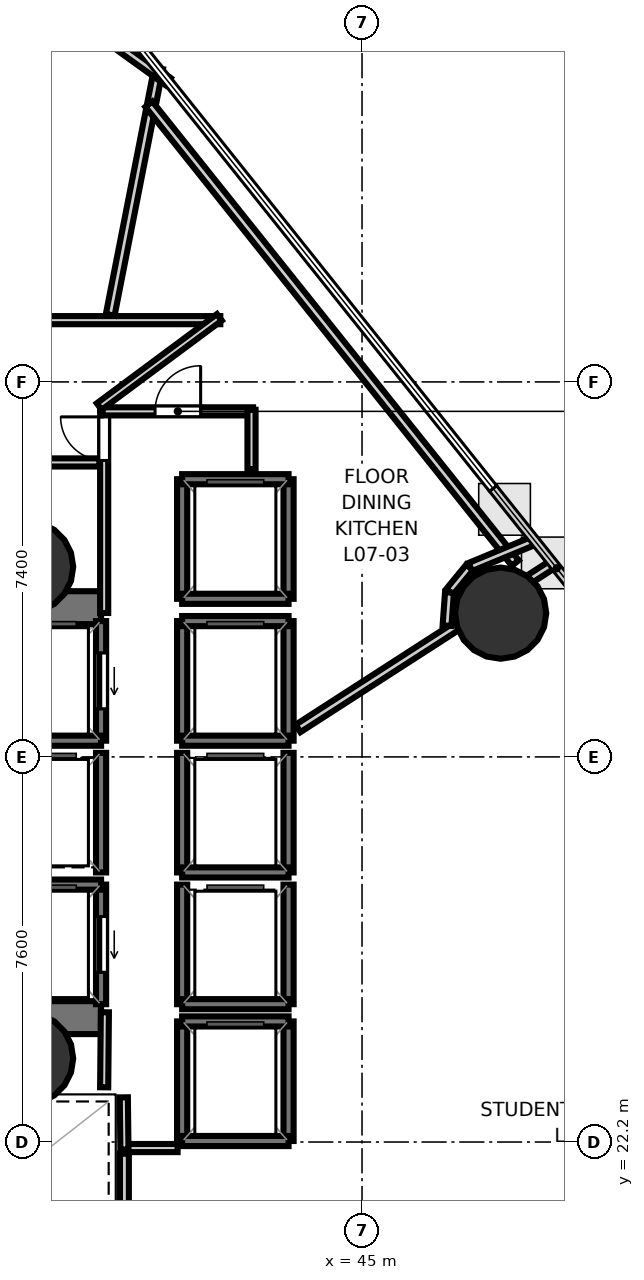
"""IFC4 building model, lengths in metres.
Left out: names, types, materials, properties, quantities, classifications, styles, units other than length and angle.
Written with IfcOpenShell. Run it as: python <this file> out.ifc"""

import sys

from ifc_helpers import new_model, si_unit, direction, frame, frame_2d, origin, origin_2d, place, context, subcontext, project, spatial, rectangle, hollow_circle, extrude, element, fill, save


model = new_model("IFC4")
c1 = context("Model", 3, precision=1e-05, world=origin(), true_north=direction((0.0, 1.0)))
c2 = subcontext(c1, "Body", "Model", "MODEL_VIEW")
j1 = project(units=[si_unit("LENGTHUNIT", "METRE"), si_unit("PLANEANGLEUNIT", "RADIAN")], contexts=[c1])
p1 = place(None, origin())
s1 = spatial("IfcSite", under=j1, at=p1, CompositionType="ELEMENT")
p2 = place(p1, origin())
s2 = spatial("IfcBuilding", under=s1, at=p2, CompositionType="ELEMENT")
p3 = place(p2, frame((0.0, 0.0, 33.1)))
s3 = spatial("IfcBuildingStorey", under=s2, at=p3, CompositionType="ELEMENT", Elevation=33.1)
p4 = place(p3, frame((29.13, 32.745, 0.0), z_axis=(0.0, 0.0, 1.0), x_axis=(1.0, 0.0, 0.0)))
e1 = element("IfcWall", 1, at=p4, inside=s3, PredefinedType="SHEAR", context=c2, shape_type="SweptSolid", body=[
    extrude(rectangle(XDim=10.72, YDim=0.65, at=frame_2d((5.36, 0.0))), origin(), (0.0, 0.0, 1.0), 3.52),
])
p5 = place(p4, frame((1.095, 0.0, 0.0)))
e2 = element("IfcOpeningElement", 2, at=p5, cuts=e1, PredefinedType="OPENING", context=c2, shape_type="SweptSolid", body=[
    extrude(rectangle(XDim=1.25, YDim=2.15, at=frame_2d((0.625, 1.075))), frame((0.0, 0.335, 0.0), z_axis=(0.0, -1.0, 0.0), x_axis=(1.0, 0.0, 0.0)), (0.0, 0.0, 1.0), 0.67),
])
p6 = place(p3, frame((29.13, 24.655, 0.0), z_axis=(0.0, 0.0, 1.0), x_axis=(1.0, 0.0, 0.0)))
e3 = element("IfcWall", 3, at=p6, inside=s3, PredefinedType="SHEAR", context=c2, shape_type="SweptSolid", body=[
    extrude(rectangle(XDim=10.72, YDim=0.65, at=frame_2d((5.36, 0.0))), origin(), (0.0, 0.0, 1.0), 3.52),
])
p7 = place(p6, frame((0.895, 0.0, 0.0)))
e4 = element("IfcOpeningElement", 4, at=p7, cuts=e3, PredefinedType="OPENING", context=c2, shape_type="SweptSolid", body=[
    extrude(rectangle(XDim=1.25, YDim=2.15, at=frame_2d((0.625, 1.075))), frame((0.0, 0.335, 0.0), z_axis=(0.0, -1.0, 0.0), x_axis=(1.0, 0.0, 0.0)), (0.0, 0.0, 1.0), 0.67),
])
for number, where, z_axis, x_axis in (
    (5, (38.4, 33.55, 0.0), (0.0, 0.0, 1.0), (1.0, 0.0, 0.0)),
    (6, (38.4, 23.85, 0.0), (0.0, 0.0, 1.0), (1.0, 0.0, 0.0)),
    (7, (47.736, 32.637, 0.0), (0.0, 0.0, 1.0), (1.0, 0.0, 0.0)),
):
    element("IfcColumn", number, at=place(p3, frame(where, z_axis=z_axis, x_axis=x_axis)), inside=s3, PredefinedType="COLUMN", context=c2, shape_type="SweptSolid", body=[
        extrude(hollow_circle(Radius=0.9, WallThickness=0.045, at=origin_2d()), origin(), (0.0, 0.0, 1.0), 3.7),
    ])
p8 = place(p3, frame((40.147, 44.413, 0.0), z_axis=(0.0, 0.0, 1.0), x_axis=(-0.997124396063, -0.07578217981, 0.0)))
e8 = element("IfcWall", 8, at=p8, inside=s3, PredefinedType="SOLIDWALL", context=c2, shape_type="SweptSolid", body=[
    extrude(rectangle(XDim=13.457, YDim=0.28, at=frame_2d((6.728, 0.0))), origin(), (0.0, 0.0, 1.0), 3.52),
])
p9 = place(p8, frame((3.137, 0.0, 0.85)))
e9 = element("IfcOpeningElement", 9, at=p9, cuts=e8, PredefinedType="OPENING", context=c2, shape_type="SweptSolid", body=[
    extrude(rectangle(XDim=1.8, YDim=2.1, at=frame_2d((0.9, 1.05))), frame((0.0, 0.15, 0.0), z_axis=(0.0, -1.0, 0.0), x_axis=(1.0, 0.0, 0.0)), (0.0, 0.0, 1.0), 0.3),
])
p10 = place(p8, frame((7.56, 0.0, 0.85)))
e10 = element("IfcOpeningElement", 10, at=p10, cuts=e8, PredefinedType="OPENING", context=c2, shape_type="SweptSolid", body=[
    extrude(rectangle(XDim=1.8, YDim=2.1, at=frame_2d((0.9, 1.05))), frame((0.0, 0.15, 0.0), z_axis=(0.0, -1.0, 0.0), x_axis=(1.0, 0.0, 0.0)), (0.0, 0.0, 1.0), 0.3),
])
p11 = place(p3, frame((39.85, 30.12, 0.0), z_axis=(0.0, 0.0, 1.0), x_axis=(0.0, 1.0, 0.0)))
e11 = element("IfcWall", 11, at=p11, inside=s3, PredefinedType="SOLIDWALL", context=c2, shape_type="SweptSolid", body=[
    extrude(rectangle(XDim=2.36, YDim=0.2, at=frame_2d((1.18, 0.0))), origin(), (0.0, 0.0, 1.0), 3.52),
])
p12 = place(p11, frame((0.63, 0.0, 0.0)))
e12 = element("IfcOpeningElement", 12, at=p12, cuts=e11, PredefinedType="OPENING", context=c2, shape_type="SweptSolid", body=[
    extrude(rectangle(XDim=1.1, YDim=2.15, at=frame_2d((0.55, 1.075))), frame((0.0, 0.11, 0.0), z_axis=(0.0, -1.0, 0.0), x_axis=(1.0, 0.0, 0.0)), (0.0, 0.0, 1.0), 0.22),
])
p13 = place(p3, frame((37.75, 30.12, 0.0), z_axis=(0.0, 0.0, 1.0), x_axis=(1.0, 0.0, 0.0)))
e13 = element("IfcWall", 13, at=p13, inside=s3, PredefinedType="SOLIDWALL", context=c2, shape_type="SweptSolid", body=[
    extrude(rectangle(XDim=2.1, YDim=0.2, at=frame_2d((1.05, 0.0))), origin(), (0.0, 0.0, 1.0), 3.52),
])
p14 = place(p3, frame((39.85, 24.92, 0.0), z_axis=(0.0, 0.0, 1.0), x_axis=(0.0, 1.0, 0.0)))
e14 = element("IfcWall", 14, at=p14, inside=s3, PredefinedType="SOLIDWALL", context=c2, shape_type="SweptSolid", body=[
    extrude(rectangle(XDim=2.36, YDim=0.2, at=frame_2d((1.18, 0.0))), origin(), (0.0, 0.0, 1.0), 3.52),
])
p15 = place(p14, frame((0.63, 0.0, 0.0)))
e15 = element("IfcOpeningElement", 15, at=p15, cuts=e14, PredefinedType="OPENING", context=c2, shape_type="SweptSolid", body=[
    extrude(rectangle(XDim=1.1, YDim=2.15, at=frame_2d((0.55, 1.075))), frame((0.0, 0.11, 0.0), z_axis=(0.0, -1.0, 0.0), x_axis=(1.0, 0.0, 0.0)), (0.0, 0.0, 1.0), 0.22),
])
p16 = place(p3, frame((37.75, 27.28, 0.0), z_axis=(0.0, 0.0, 1.0), x_axis=(1.0, 0.0, 0.0)))
e16 = element("IfcWall", 16, at=p16, inside=s3, PredefinedType="SOLIDWALL", context=c2, shape_type="SweptSolid", body=[
    extrude(rectangle(XDim=2.1, YDim=0.2, at=frame_2d((1.05, 0.0))), origin(), (0.0, 0.0, 1.0), 3.52),
])
for number, where, z_axis, x_axis in (
    (17, (43.55, 30.12, 0.0), (0.0, 0.0, 1.0), (0.0, 1.0, 0.0)),
    (18, (41.45, 30.12, 0.0), (0.0, 0.0, 1.0), (0.0, 1.0, 0.0)),
):
    element("IfcWall", number, at=place(p3, frame(where, z_axis=z_axis, x_axis=x_axis)), inside=s3, PredefinedType="SOLIDWALL", context=c2, shape_type="SweptSolid", body=[
        extrude(rectangle(XDim=2.36, YDim=0.2, at=frame_2d((1.18, 0.0))), origin(), (0.0, 0.0, 1.0), 3.52),
    ])
for number, where, z_axis, x_axis in (
    (19, (41.45, 32.48, 0.0), (0.0, 0.0, 1.0), (1.0, 0.0, 0.0)),
    (20, (41.45, 30.12, 0.0), (0.0, 0.0, 1.0), (1.0, 0.0, 0.0)),
):
    element("IfcWall", number, at=place(p3, frame(where, z_axis=z_axis, x_axis=x_axis)), inside=s3, PredefinedType="SOLIDWALL", context=c2, shape_type="SweptSolid", body=[
        extrude(rectangle(XDim=2.1, YDim=0.2, at=frame_2d((1.05, 0.0))), origin(), (0.0, 0.0, 1.0), 3.52),
    ])
for number, where, z_axis, x_axis in (
    (21, (43.55, 27.52, 0.0), (0.0, 0.0, 1.0), (0.0, 1.0, 0.0)),
    (22, (41.45, 27.52, 0.0), (0.0, 0.0, 1.0), (0.0, 1.0, 0.0)),
):
    element("IfcWall", number, at=place(p3, frame(where, z_axis=z_axis, x_axis=x_axis)), inside=s3, PredefinedType="SOLIDWALL", context=c2, shape_type="SweptSolid", body=[
        extrude(rectangle(XDim=2.36, YDim=0.2, at=frame_2d((1.18, 0.0))), origin(), (0.0, 0.0, 1.0), 3.52),
    ])
p17 = place(p3, frame((41.45, 27.52, 0.0), z_axis=(0.0, 0.0, 1.0), x_axis=(1.0, 0.0, 0.0)))
e23 = element("IfcWall", 23, at=p17, inside=s3, PredefinedType="SOLIDWALL", context=c2, shape_type="SweptSolid", body=[
    extrude(rectangle(XDim=2.1, YDim=0.2, at=frame_2d((1.05, 0.0))), origin(), (0.0, 0.0, 1.0), 3.52),
])
for number, where, z_axis, x_axis in (
    (24, (43.55, 24.92, 0.0), (0.0, 0.0, 1.0), (0.0, 1.0, 0.0)),
    (25, (41.45, 24.92, 0.0), (0.0, 0.0, 1.0), (0.0, 1.0, 0.0)),
):
    element("IfcWall", number, at=place(p3, frame(where, z_axis=z_axis, x_axis=x_axis)), inside=s3, PredefinedType="SOLIDWALL", context=c2, shape_type="SweptSolid", body=[
        extrude(rectangle(XDim=2.36, YDim=0.2, at=frame_2d((1.18, 0.0))), origin(), (0.0, 0.0, 1.0), 3.52),
    ])
p18 = place(p3, frame((41.45, 24.92, 0.0), z_axis=(0.0, 0.0, 1.0), x_axis=(1.0, 0.0, 0.0)))
e26 = element("IfcWall", 26, at=p18, inside=s3, PredefinedType="SOLIDWALL", context=c2, shape_type="SweptSolid", body=[
    extrude(rectangle(XDim=2.1, YDim=0.2, at=frame_2d((1.05, 0.0))), origin(), (0.0, 0.0, 1.0), 3.52),
])
p19 = place(p3, frame((39.85, 27.52, 0.0), z_axis=(0.0, 0.0, 1.0), x_axis=(0.0, 1.0, 0.0)))
e27 = element("IfcWall", 27, at=p19, inside=s3, PredefinedType="SOLIDWALL", context=c2, shape_type="SweptSolid", body=[
    extrude(rectangle(XDim=2.36, YDim=0.2, at=frame_2d((1.18, 0.0))), origin(), (0.0, 0.0, 1.0), 3.52),
])
for number, where, z_axis, x_axis in (
    (28, (43.55, 22.22, 0.0), (0.0, 0.0, 1.0), (0.0, 1.0, 0.0)),
    (29, (41.45, 22.22, 0.0), (0.0, 0.0, 1.0), (0.0, 1.0, 0.0)),
):
    element("IfcWall", number, at=place(p3, frame(where, z_axis=z_axis, x_axis=x_axis)), inside=s3, PredefinedType="SOLIDWALL", context=c2, shape_type="SweptSolid", body=[
        extrude(rectangle(XDim=2.36, YDim=0.2, at=frame_2d((1.18, 0.0))), origin(), (0.0, 0.0, 1.0), 3.52),
    ])
for number, where, z_axis, x_axis in (
    (30, (41.45, 24.58, 0.0), (0.0, 0.0, 1.0), (1.0, 0.0, 0.0)),
    (31, (41.45, 22.22, 0.0), (0.0, 0.0, 1.0), (1.0, 0.0, 0.0)),
):
    element("IfcWall", number, at=place(p3, frame(where, z_axis=z_axis, x_axis=x_axis)), inside=s3, PredefinedType="SOLIDWALL", context=c2, shape_type="SweptSolid", body=[
        extrude(rectangle(XDim=2.1, YDim=0.2, at=frame_2d((1.05, 0.0))), origin(), (0.0, 0.0, 1.0), 3.52),
    ])
for number, where, z_axis, x_axis in (
    (32, (43.55, 32.92, 0.0), (0.0, 0.0, 1.0), (0.0, 1.0, 0.0)),
    (33, (41.45, 32.92, 0.0), (0.0, 0.0, 1.0), (0.0, 1.0, 0.0)),
):
    element("IfcWall", number, at=place(p3, frame(where, z_axis=z_axis, x_axis=x_axis)), inside=s3, PredefinedType="SOLIDWALL", context=c2, shape_type="SweptSolid", body=[
        extrude(rectangle(XDim=2.36, YDim=0.2, at=frame_2d((1.18, 0.0))), origin(), (0.0, 0.0, 1.0), 3.52),
    ])
for number, where, z_axis, x_axis in (
    (34, (41.45, 35.28, 0.0), (0.0, 0.0, 1.0), (1.0, 0.0, 0.0)),
    (35, (41.45, 32.92, 0.0), (0.0, 0.0, 1.0), (1.0, 0.0, 0.0)),
):
    element("IfcWall", number, at=place(p3, frame(where, z_axis=z_axis, x_axis=x_axis)), inside=s3, PredefinedType="SOLIDWALL", context=c2, shape_type="SweptSolid", body=[
        extrude(rectangle(XDim=2.1, YDim=0.2, at=frame_2d((1.05, 0.0))), origin(), (0.0, 0.0, 1.0), 3.52),
    ])
p20 = place(p3, frame((39.911, 32.64, 0.0), z_axis=(0.0, 0.0, 1.0), x_axis=(0.0, 1.0, 0.0)))
e36 = element("IfcWall", 36, at=p20, inside=s3, PredefinedType="PARTITIONING", context=c2, shape_type="SweptSolid", body=[
    extrude(rectangle(XDim=4.01, YDim=0.16, at=frame_2d((2.005, 0.0))), origin(), (0.0, 0.0, 1.0), 2.84),
])
p21 = place(p20, frame((3.01, 0.0, 0.0)))
e37 = element("IfcOpeningElement", 37, at=p21, cuts=e36, PredefinedType="OPENING", context=c2, shape_type="SweptSolid", body=[
    extrude(rectangle(XDim=0.86, YDim=2.05, at=frame_2d((0.43, 1.025))), frame((0.0, 0.09, 0.0), z_axis=(0.0, -1.0, 0.0), x_axis=(1.0, 0.0, 0.0)), (0.0, 0.0, 1.0), 0.18),
])
p22 = place(p3, frame((39.88, 36.619, 0.0), z_axis=(0.0, 0.0, 1.0), x_axis=(1.0, 0.0, 0.0)))
e38 = element("IfcWall", 38, at=p22, inside=s3, PredefinedType="PARTITIONING", context=c2, shape_type="SweptSolid", body=[
    extrude(rectangle(XDim=2.97, YDim=0.16, at=frame_2d((1.485, 0.0))), origin(), (0.0, 0.0, 1.0), 2.84),
])
p23 = place(p22, frame((1.035, 0.0, 0.0)))
e39 = element("IfcOpeningElement", 39, at=p23, cuts=e38, PredefinedType="OPENING", context=c2, shape_type="SweptSolid", body=[
    extrude(rectangle(XDim=0.9, YDim=2.1, at=frame_2d((0.45, 1.05))), frame((0.0, 0.09, 0.0), z_axis=(0.0, -1.0, 0.0), x_axis=(1.0, 0.0, 0.0)), (0.0, 0.0, 1.0), 0.18),
])
p24 = place(p3, frame((42.819, 36.65, 0.0), z_axis=(0.0, 0.0, 1.0), x_axis=(0.0, -1.0, 0.0)))
e40 = element("IfcWall", 40, at=p24, inside=s3, PredefinedType="PARTITIONING", context=c2, shape_type="SweptSolid", body=[
    extrude(rectangle(XDim=1.17, YDim=0.16, at=frame_2d((0.585, 0.0))), origin(), (0.0, 0.0, 1.0), 2.84),
])
p25 = place(p3, frame((41.36, 22.081, 0.0), z_axis=(0.0, 0.0, 1.0), x_axis=(-1.0, 0.0, 0.0)))
e41 = element("IfcWall", 41, at=p25, inside=s3, PredefinedType="PARTITIONING", context=c2, shape_type="SweptSolid", body=[
    extrude(rectangle(XDim=1.08, YDim=0.16, at=frame_2d((0.54, 0.0))), origin(), (0.0, 0.0, 1.0), 2.84),
])
p26 = place(p3, frame((40.311, 22.05, 0.0), z_axis=(0.0, 0.0, 1.0), x_axis=(-0.011836292006, 0.999929948642, 0.0)))
e42 = element("IfcWall", 42, at=p26, inside=s3, PredefinedType="PARTITIONING", context=c2, shape_type="SweptSolid", body=[
    extrude(rectangle(XDim=1.031, YDim=0.16, at=frame_2d((0.516, 0.0))), origin(), (0.0, 0.0, 1.0), 2.84),
])
p27 = place(p3, frame((39.911, 23.28, 0.0), z_axis=(0.0, 0.0, 1.0), x_axis=(0.009397771291, 0.999955839972, 0.0)))
e43 = element("IfcWall", 43, at=p27, inside=s3, PredefinedType="PARTITIONING", context=c2, shape_type="SweptSolid", body=[
    extrude(rectangle(XDim=1.481, YDim=0.16, at=frame_2d((0.74, 0.0))), origin(), (0.0, 0.0, 1.0), 2.84),
])
p28 = place(p3, frame((26.42, 38.419, 0.0), z_axis=(0.0, 0.0, 1.0), x_axis=(1.0, 0.0, 0.0)))
e44 = element("IfcWall", 44, at=p28, inside=s3, PredefinedType="PARTITIONING", context=c2, shape_type="SweptSolid", body=[
    extrude(rectangle(XDim=15.783, YDim=0.16, at=frame_2d((7.892, 0.0))), origin(), (0.0, 0.0, 1.0), 2.798),
])
p29 = place(p28, frame((9.246, 0.0, 0.0)))
e45 = element("IfcOpeningElement", 45, at=p29, cuts=e44, PredefinedType="OPENING", context=c2, shape_type="SweptSolid", body=[
    extrude(rectangle(XDim=0.9, YDim=2.1, at=frame_2d((0.45, 1.05))), frame((0.0, 0.09, 0.0), z_axis=(0.0, -1.0, 0.0), x_axis=(1.0, 0.0, 0.0)), (0.0, 0.0, 1.0), 0.18),
])
p30 = place(p28, frame((2.836, 0.0, 0.0)))
e46 = element("IfcOpeningElement", 46, at=p30, cuts=e44, PredefinedType="OPENING", context=c2, shape_type="SweptSolid", body=[
    extrude(rectangle(XDim=0.9, YDim=2.1, at=frame_2d((0.45, 1.05))), frame((0.0, 0.09, 0.0), z_axis=(0.0, -1.0, 0.0), x_axis=(1.0, 0.0, 0.0)), (0.0, 0.0, 1.0), 0.18),
])
p31 = place(p3, frame((42.185, 38.475, 0.0), z_axis=(0.0, 0.0, 1.0), x_axis=(-0.802818467394, -0.596223538961, 0.0)))
e47 = element("IfcWall", 47, at=p31, inside=s3, PredefinedType="PARTITIONING", context=c2, shape_type="SweptSolid", body=[
    extrude(rectangle(XDim=2.953, YDim=0.16, at=frame_2d((1.477, 0.0))), origin(), (0.0, 0.0, 1.0), 2.798),
])
p32 = place(p3, frame((39.818, 35.611, 0.0), z_axis=(0.0, 0.0, 1.0), x_axis=(-1.0, 0.0, 0.0)))
e48 = element("IfcWall", 48, at=p32, inside=s3, PredefinedType="PARTITIONING", context=c2, shape_type="SweptSolid", body=[
    extrude(rectangle(XDim=2.768, YDim=0.16, at=frame_2d((1.384, 0.0))), origin(), (0.0, 0.0, 1.0), 2.84),
])
p33 = place(p3, frame((40.311, 18.0, 0.0), z_axis=(0.0, 0.0, 1.0), x_axis=(0.0, 1.0, 0.0)))
e49 = element("IfcWall", 49, at=p33, inside=s3, PredefinedType="PLUMBINGWALL", context=c2, shape_type="SweptSolid", body=[
    extrude(rectangle(XDim=3.97, YDim=0.175, at=frame_2d((1.985, 0.0))), origin(), (0.0, 0.0, 1.0), 2.84),
])
p34 = place(p3, frame((43.737, 30.362, 0.0), z_axis=(0.0, 0.0, 1.0), x_axis=(0.840502421902, 0.541807787667, 0.0)))
e50 = element("IfcWall", 50, at=p34, inside=s3, PredefinedType="PLUMBINGWALL", context=c2, shape_type="SweptSolid", body=[
    extrude(rectangle(XDim=6.013, YDim=0.175, at=frame_2d((3.007, 0.0))), origin(), (0.0, 0.0, 1.0), 2.798),
])
p35 = place(p3, frame((40.031, 38.524, 0.0), z_axis=(0.0, 0.0, 1.0), x_axis=(0.192440494931, 0.981308644571, 0.0)))
e51 = element("IfcWall", 51, at=p35, inside=s3, PredefinedType="PLUMBINGWALL", context=c2, shape_type="SweptSolid", body=[
    extrude(rectangle(XDim=4.958, YDim=0.175, at=frame_2d((2.479, 0.0))), origin(), (0.0, 0.0, 1.0), 2.798),
])
p36 = place(p3, frame((40.794, 42.681, 0.0), z_axis=(0.0, 0.0, 1.0), x_axis=(0.623977950445, -0.781441947529, 0.0)))
e52 = element("IfcWall", 52, at=p36, inside=s3, PredefinedType="PLUMBINGWALL", context=c2, shape_type="SweptSolid", body=[
    extrude(rectangle(XDim=11.588, YDim=0.175, at=frame_2d((5.794, 0.0))), origin(), (0.0, 0.0, 1.0), 2.798),
])
p37 = place(p3, frame((48.423, 34.08, 0.0), z_axis=(0.0, 0.0, 1.0), x_axis=(-0.923888707417, -0.382661281433, 0.0)))
e53 = element("IfcWall", 53, at=p37, inside=s3, PredefinedType="PLUMBINGWALL", context=c2, shape_type="SweptSolid", body=[
    extrude(rectangle(XDim=1.393, YDim=0.175, at=frame_2d((0.697, 0.0))), origin(), (0.0, 0.0, 1.0), 2.798),
])
p38 = place(p3, frame((47.123, 33.538, 0.0), z_axis=(0.0, 0.0, 1.0), x_axis=(-0.634274060347, -0.773108282436, 0.0)))
e54 = element("IfcWall", 54, at=p38, inside=s3, PredefinedType="PLUMBINGWALL", context=c2, shape_type="SweptSolid", body=[
    extrude(rectangle(XDim=0.615, YDim=0.175, at=frame_2d((0.308, 0.0))), origin(), (0.0, 0.0, 1.0), 2.798),
])
p39 = place(p3, frame((46.726, 33.045, 0.0), z_axis=(0.0, 0.0, 1.0), x_axis=(-0.072993708231, -0.997332401238, 0.0)))
e55 = element("IfcWall", 55, at=p39, inside=s3, PredefinedType="PLUMBINGWALL", context=c2, shape_type="SweptSolid", body=[
    extrude(rectangle(XDim=0.656, YDim=0.175, at=frame_2d((0.328, 0.0))), origin(), (0.0, 0.0, 1.0), 2.84),
])
p40 = place(p3, frame((39.44, 44.376, 0.0), z_axis=(0.0, 0.0, 1.0), x_axis=(0.81138921051, -0.584506243822, 0.0)))
e56 = element("IfcWall", 56, at=p40, inside=s3, PredefinedType="PLUMBINGWALL", context=c2, shape_type="SweptSolid", body=[
    extrude(rectangle(XDim=2.138, YDim=0.175, at=frame_2d((1.069, 0.0))), origin(), (0.0, 0.0, 1.0), 2.84),
])
p41 = place(p12, origin())
e57 = element("IfcDoor", 57, at=p41, inside=s3, OperationType="SLIDING_TO_LEFT", PredefinedType="DOOR", context=c2, shape_type="SweptSolid", body=[
    extrude(rectangle(XDim=1.1, YDim=2.15, at=frame_2d((0.55, 1.075))), frame((0.0, 0.025, 0.0), z_axis=(0.0, -1.0, 0.0), x_axis=(1.0, 0.0, 0.0)), (0.0, 0.0, 1.0), 0.05),
])
fill(e12, e57)
p42 = place(p15, origin())
e58 = element("IfcDoor", 58, at=p42, inside=s3, OperationType="SLIDING_TO_LEFT", PredefinedType="DOOR", context=c2, shape_type="SweptSolid", body=[
    extrude(rectangle(XDim=1.1, YDim=2.15, at=frame_2d((0.55, 1.075))), frame((0.0, 0.025, 0.0), z_axis=(0.0, -1.0, 0.0), x_axis=(1.0, 0.0, 0.0)), (0.0, 0.0, 1.0), 0.05),
])
fill(e15, e58)
p43 = place(p21, origin())
e59 = element("IfcDoor", 59, at=p43, inside=s3, OperationType="SINGLE_SWING_RIGHT", PredefinedType="DOOR", context=c2, shape_type="SweptSolid", body=[
    extrude(rectangle(XDim=0.86, YDim=2.05, at=frame_2d((0.43, 1.025))), frame((0.0, 0.025, 0.0), z_axis=(0.0, -1.0, 0.0), x_axis=(1.0, 0.0, 0.0)), (0.0, 0.0, 1.0), 0.05),
])
fill(e37, e59)
p44 = place(p23, origin())
e60 = element("IfcDoor", 60, at=p44, inside=s3, OperationType="SINGLE_SWING_RIGHT", PredefinedType="DOOR", context=c2, shape_type="SweptSolid", body=[
    extrude(rectangle(XDim=0.9, YDim=2.1, at=frame_2d((0.45, 1.05))), frame((0.0, 0.025, 0.0), z_axis=(0.0, -1.0, 0.0), x_axis=(1.0, 0.0, 0.0)), (0.0, 0.0, 1.0), 0.05),
])
fill(e39, e60)
save(model, sys.argv[1])
